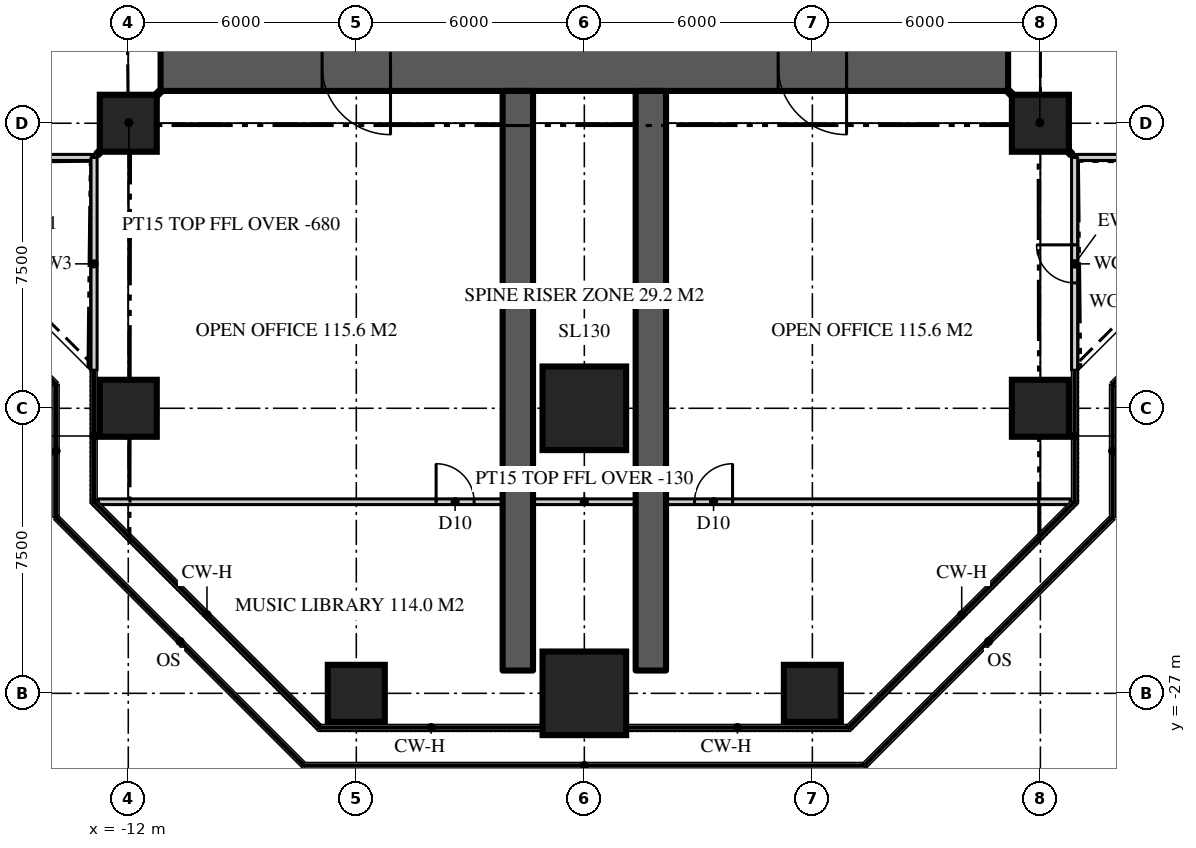
"""IFC4 building model, lengths in metres.
Left out: names, types, materials, properties, quantities, classifications, styles, units other than length and angle.
Written with IfcOpenShell. Run it as: python <this file> out.ifc"""

import sys

from ifc_helpers import new_model, si_unit, direction, frame, frame_2d, origin, origin_2d, place, context, subcontext, project, spatial, rectangle, extrude, element, fill, save


model = new_model("IFC4")
c1 = context("Model", 3, precision=1e-05, world=origin(), true_north=direction((0.0, 1.0)))
c2 = subcontext(c1, "Body", "Model", "MODEL_VIEW")
j1 = project(units=[si_unit("LENGTHUNIT", "METRE"), si_unit("PLANEANGLEUNIT", "RADIAN")], contexts=[c1])
p1 = place(None, origin())
s1 = spatial("IfcSite", under=j1, at=p1, CompositionType="ELEMENT")
p2 = place(p1, origin())
s2 = spatial("IfcBuilding", under=s1, at=p2, CompositionType="ELEMENT")
p3 = place(p2, frame((0.0, 0.0, 212.7)))
s3 = spatial("IfcBuildingStorey", under=s2, at=p3, CompositionType="ELEMENT", Elevation=212.7)
p4 = place(p3, frame((11.15, -10.5, 0.0), z_axis=(0.0, 0.0, 1.0), x_axis=(-1.0, 0.0, 0.0)))
e1 = element("IfcWall", 1, at=p4, inside=s3, PredefinedType="SHEAR", context=c2, shape_type="SweptSolid", body=[
    extrude(rectangle(XDim=22.3, YDim=1.3, at=frame_2d((11.15, 0.0))), origin(), (0.0, 0.0, 1.0), 3.9),
])
p5 = place(p4, frame((16.25, 0.0, 0.0)))
e2 = element("IfcOpeningElement", 2, at=p5, cuts=e1, PredefinedType="OPENING", context=c2, shape_type="SweptSolid", body=[
    extrude(rectangle(XDim=1.8, YDim=2.2, at=frame_2d((0.9, 1.1))), frame((0.0, 0.66, 0.0), z_axis=(0.0, -1.0, 0.0), x_axis=(1.0, 0.0, 0.0)), (0.0, 0.0, 1.0), 1.32),
])
p6 = place(p4, frame((4.25, 0.0, 0.0)))
e3 = element("IfcOpeningElement", 3, at=p6, cuts=e1, PredefinedType="OPENING", context=c2, shape_type="SweptSolid", body=[
    extrude(rectangle(XDim=1.8, YDim=2.2, at=frame_2d((0.9, 1.1))), frame((0.0, 0.66, 0.0), z_axis=(0.0, -1.0, 0.0), x_axis=(1.0, 0.0, 0.0)), (0.0, 0.0, 1.0), 1.32),
])
for number, where, z_axis, x_axis in (
    (4, (-1.75, -11.15, 0.0), (0.0, 0.0, 1.0), (0.0, -1.0, 0.0)),
    (5, (1.75, -11.15, 0.0), (0.0, 0.0, 1.0), (0.0, -1.0, 0.0)),
):
    element("IfcWall", number, at=place(p3, frame(where, z_axis=z_axis, x_axis=x_axis)), inside=s3, PredefinedType="SHEAR", context=c2, shape_type="SweptSolid", body=[
        extrude(rectangle(XDim=15.25, YDim=0.8, at=frame_2d((7.625, 0.0))), origin(), (0.0, 0.0, 1.0), 3.9),
    ])
p7 = place(p3, frame((-6.0, -27.0, 0.0), z_axis=(0.0, 0.0, 1.0), x_axis=(1.0, 0.0, 0.0)))
e6 = element("IfcColumn", 6, at=p7, inside=s3, PredefinedType="COLUMN", context=c2, shape_type="SweptSolid", body=[
    extrude(rectangle(XDim=1.5, YDim=1.5, at=origin_2d()), origin(), (0.0, 0.0, 1.0), 3.9),
])
p8 = place(p3, frame((0.0, -27.0, 0.0), z_axis=(0.0, 0.0, 1.0), x_axis=(1.0, 0.0, 0.0)))
e7 = element("IfcColumn", 7, at=p8, inside=s3, PredefinedType="COLUMN", context=c2, shape_type="SweptSolid", body=[
    extrude(rectangle(XDim=2.2, YDim=2.2, at=origin_2d()), origin(), (0.0, 0.0, 1.0), 3.9),
])
for number, where, z_axis, x_axis in (
    (8, (6.0, -27.0, 0.0), (0.0, 0.0, 1.0), (1.0, 0.0, 0.0)),
    (9, (-12.0, -19.5, 0.0), (0.0, 0.0, 1.0), (1.0, 0.0, 0.0)),
):
    element("IfcColumn", number, at=place(p3, frame(where, z_axis=z_axis, x_axis=x_axis)), inside=s3, PredefinedType="COLUMN", context=c2, shape_type="SweptSolid", body=[
        extrude(rectangle(XDim=1.5, YDim=1.5, at=origin_2d()), origin(), (0.0, 0.0, 1.0), 3.9),
    ])
p9 = place(p3, frame((0.0, -19.5, 0.0), z_axis=(0.0, 0.0, 1.0), x_axis=(1.0, 0.0, 0.0)))
e10 = element("IfcColumn", 10, at=p9, inside=s3, PredefinedType="COLUMN", context=c2, shape_type="SweptSolid", body=[
    extrude(rectangle(XDim=2.2, YDim=2.2, at=origin_2d()), origin(), (0.0, 0.0, 1.0), 3.9),
])
for number, where, z_axis, x_axis in (
    (11, (12.0, -19.5, 0.0), (0.0, 0.0, 1.0), (1.0, 0.0, 0.0)),
    (12, (-12.0, -12.0, 0.0), (0.0, 0.0, 1.0), (1.0, 0.0, 0.0)),
    (13, (12.0, -12.0, 0.0), (0.0, 0.0, 1.0), (1.0, 0.0, 0.0)),
):
    element("IfcColumn", number, at=place(p3, frame(where, z_axis=z_axis, x_axis=x_axis)), inside=s3, PredefinedType="COLUMN", context=c2, shape_type="SweptSolid", body=[
        extrude(rectangle(XDim=1.5, YDim=1.5, at=origin_2d()), origin(), (0.0, 0.0, 1.0), 3.9),
    ])
p10 = place(p3, frame((12.9, -12.9, 0.0), z_axis=(0.0, 0.0, 1.0), x_axis=(1.0, 0.0, 0.0)))
e14 = element("IfcWall", 14, at=p10, inside=s3, PredefinedType="SOLIDWALL", context=c2, shape_type="SweptSolid", body=[
    extrude(rectangle(XDim=5.6, YDim=0.16, at=frame_2d((2.8, 0.0))), origin(), (0.0, 0.0, 1.0), 3.77),
])
p11 = place(p3, frame((-18.5, -12.9, 0.0), z_axis=(0.0, 0.0, 1.0), x_axis=(1.0, 0.0, 0.0)))
e15 = element("IfcWall", 15, at=p11, inside=s3, PredefinedType="SOLIDWALL", context=c2, shape_type="SweptSolid", body=[
    extrude(rectangle(XDim=5.6, YDim=0.16, at=frame_2d((2.8, 0.0))), origin(), (0.0, 0.0, 1.0), 3.77),
])
p12 = place(p11, frame((2.3, 0.0, 0.0)))
e16 = element("IfcOpeningElement", 16, at=p12, cuts=e15, PredefinedType="OPENING", context=c2, shape_type="SweptSolid", body=[
    extrude(rectangle(XDim=1.0, YDim=2.2, at=frame_2d((0.5, 1.1))), frame((0.0, 0.09, 0.0), z_axis=(0.0, -1.0, 0.0), x_axis=(1.0, 0.0, 0.0)), (0.0, 0.0, 1.0), 0.18),
])
p13 = place(p3, frame((-12.9, -12.9, 0.0), z_axis=(0.0, 0.0, 1.0), x_axis=(0.0, -1.0, 0.0)))
e17 = element("IfcWall", 17, at=p13, inside=s3, PredefinedType="SOLIDWALL", context=c2, shape_type="SweptSolid", body=[
    extrude(rectangle(XDim=5.6, YDim=0.16, at=frame_2d((2.8, 0.0))), origin(), (0.0, 0.0, 1.0), 3.77),
])
p14 = place(p3, frame((12.9, -18.5, 0.0), z_axis=(0.0, 0.0, 1.0), x_axis=(0.0, 1.0, 0.0)))
e18 = element("IfcWall", 18, at=p14, inside=s3, PredefinedType="SOLIDWALL", context=c2, shape_type="SweptSolid", body=[
    extrude(rectangle(XDim=5.6, YDim=0.16, at=frame_2d((2.8, 0.0))), origin(), (0.0, 0.0, 1.0), 3.77),
])
p15 = place(p14, frame((2.3, 0.0, 0.0)))
e19 = element("IfcOpeningElement", 19, at=p15, cuts=e18, PredefinedType="OPENING", context=c2, shape_type="SweptSolid", body=[
    extrude(rectangle(XDim=1.0, YDim=2.2, at=frame_2d((0.5, 1.1))), frame((0.0, 0.09, 0.0), z_axis=(0.0, -1.0, 0.0), x_axis=(1.0, 0.0, 0.0)), (0.0, 0.0, 1.0), 0.18),
])
p16 = place(p3, frame((-12.786, -21.959, 0.0), z_axis=(0.0, 0.0, 1.0), x_axis=(1.0, 0.0, 0.0)))
e20 = element("IfcWall", 20, at=p16, inside=s3, PredefinedType="PARTITIONING", context=c2, shape_type="SweptSolid", body=[
    extrude(rectangle(XDim=25.573, YDim=0.15, at=frame_2d((12.786, 0.0))), origin(), (0.0, 0.0, 1.0), 3.77),
])
p17 = place(p16, frame((15.687, 0.0, 0.0)))
e21 = element("IfcOpeningElement", 21, at=p17, cuts=e20, PredefinedType="OPENING", context=c2, shape_type="SweptSolid", body=[
    extrude(rectangle(XDim=1.0, YDim=2.2, at=frame_2d((0.5, 1.1))), frame((0.0, 0.085, 0.0), z_axis=(0.0, -1.0, 0.0), x_axis=(1.0, 0.0, 0.0)), (0.0, 0.0, 1.0), 0.17),
])
p18 = place(p16, frame((8.886, 0.0, 0.0)))
e22 = element("IfcOpeningElement", 22, at=p18, cuts=e20, PredefinedType="OPENING", context=c2, shape_type="SweptSolid", body=[
    extrude(rectangle(XDim=1.0, YDim=2.2, at=frame_2d((0.5, 1.1))), frame((0.0, 0.085, 0.0), z_axis=(0.0, -1.0, 0.0), x_axis=(1.0, 0.0, 0.0)), (0.0, 0.0, 1.0), 0.17),
])
for number, where, z_axis, x_axis in (
    (23, (-11.15, -11.15, 0.0), (0.0, 0.0, 1.0), (-0.707, -0.707, 0.0)),
    (24, (11.15, -11.15, 0.0), (0.0, 0.0, 1.0), (0.707, -0.707, 0.0)),
):
    element("IfcWall", number, at=place(p3, frame(where, z_axis=z_axis, x_axis=x_axis)), inside=s3, PredefinedType="PARTITIONING", context=c2, shape_type="SweptSolid", body=[
        extrude(rectangle(XDim=2.362, YDim=0.15, at=frame_2d((1.181, 0.0))), origin(), (0.0, 0.0, 1.0), 3.22),
    ])
p19 = place(p15, origin())
e25 = element("IfcDoor", 25, at=p19, inside=s3, OperationType="SINGLE_SWING_RIGHT", PredefinedType="DOOR", context=c2, shape_type="SweptSolid", body=[
    extrude(rectangle(XDim=1.0, YDim=2.2, at=frame_2d((0.5, 1.1))), frame((0.0, 0.025, 0.0), z_axis=(0.0, -1.0, 0.0), x_axis=(1.0, 0.0, 0.0)), (0.0, 0.0, 1.0), 0.05),
])
fill(e19, e25)
p20 = place(p5, origin())
e26 = element("IfcDoor", 26, at=p20, inside=s3, OperationType="DOUBLE_DOOR_DOUBLE_SWING", PredefinedType="DOOR", context=c2, shape_type="SweptSolid", body=[
    extrude(rectangle(XDim=1.8, YDim=2.2, at=frame_2d((0.9, 1.1))), frame((0.0, 0.025, 0.0), z_axis=(0.0, -1.0, 0.0), x_axis=(1.0, 0.0, 0.0)), (0.0, 0.0, 1.0), 0.05),
])
fill(e2, e26)
p21 = place(p6, origin())
e27 = element("IfcDoor", 27, at=p21, inside=s3, OperationType="DOUBLE_DOOR_DOUBLE_SWING", PredefinedType="DOOR", context=c2, shape_type="SweptSolid", body=[
    extrude(rectangle(XDim=1.8, YDim=2.2, at=frame_2d((0.9, 1.1))), frame((0.0, 0.025, 0.0), z_axis=(0.0, -1.0, 0.0), x_axis=(1.0, 0.0, 0.0)), (0.0, 0.0, 1.0), 0.05),
])
fill(e3, e27)
p22 = place(p17, origin())
e28 = element("IfcDoor", 28, at=p22, inside=s3, OperationType="SINGLE_SWING_RIGHT", PredefinedType="DOOR", context=c2, shape_type="SweptSolid", body=[
    extrude(rectangle(XDim=1.0, YDim=2.2, at=frame_2d((0.5, 1.1))), frame((0.0, 0.025, 0.0), z_axis=(0.0, -1.0, 0.0), x_axis=(1.0, 0.0, 0.0)), (0.0, 0.0, 1.0), 0.05),
])
fill(e21, e28)
p23 = place(p18, origin())
e29 = element("IfcDoor", 29, at=p23, inside=s3, OperationType="SINGLE_SWING_LEFT", PredefinedType="DOOR", context=c2, shape_type="SweptSolid", body=[
    extrude(rectangle(XDim=1.0, YDim=2.2, at=frame_2d((0.5, 1.1))), frame((0.0, 0.025, 0.0), z_axis=(0.0, -1.0, 0.0), x_axis=(1.0, 0.0, 0.0)), (0.0, 0.0, 1.0), 0.05),
])
fill(e22, e29)
save(model, sys.argv[1])
